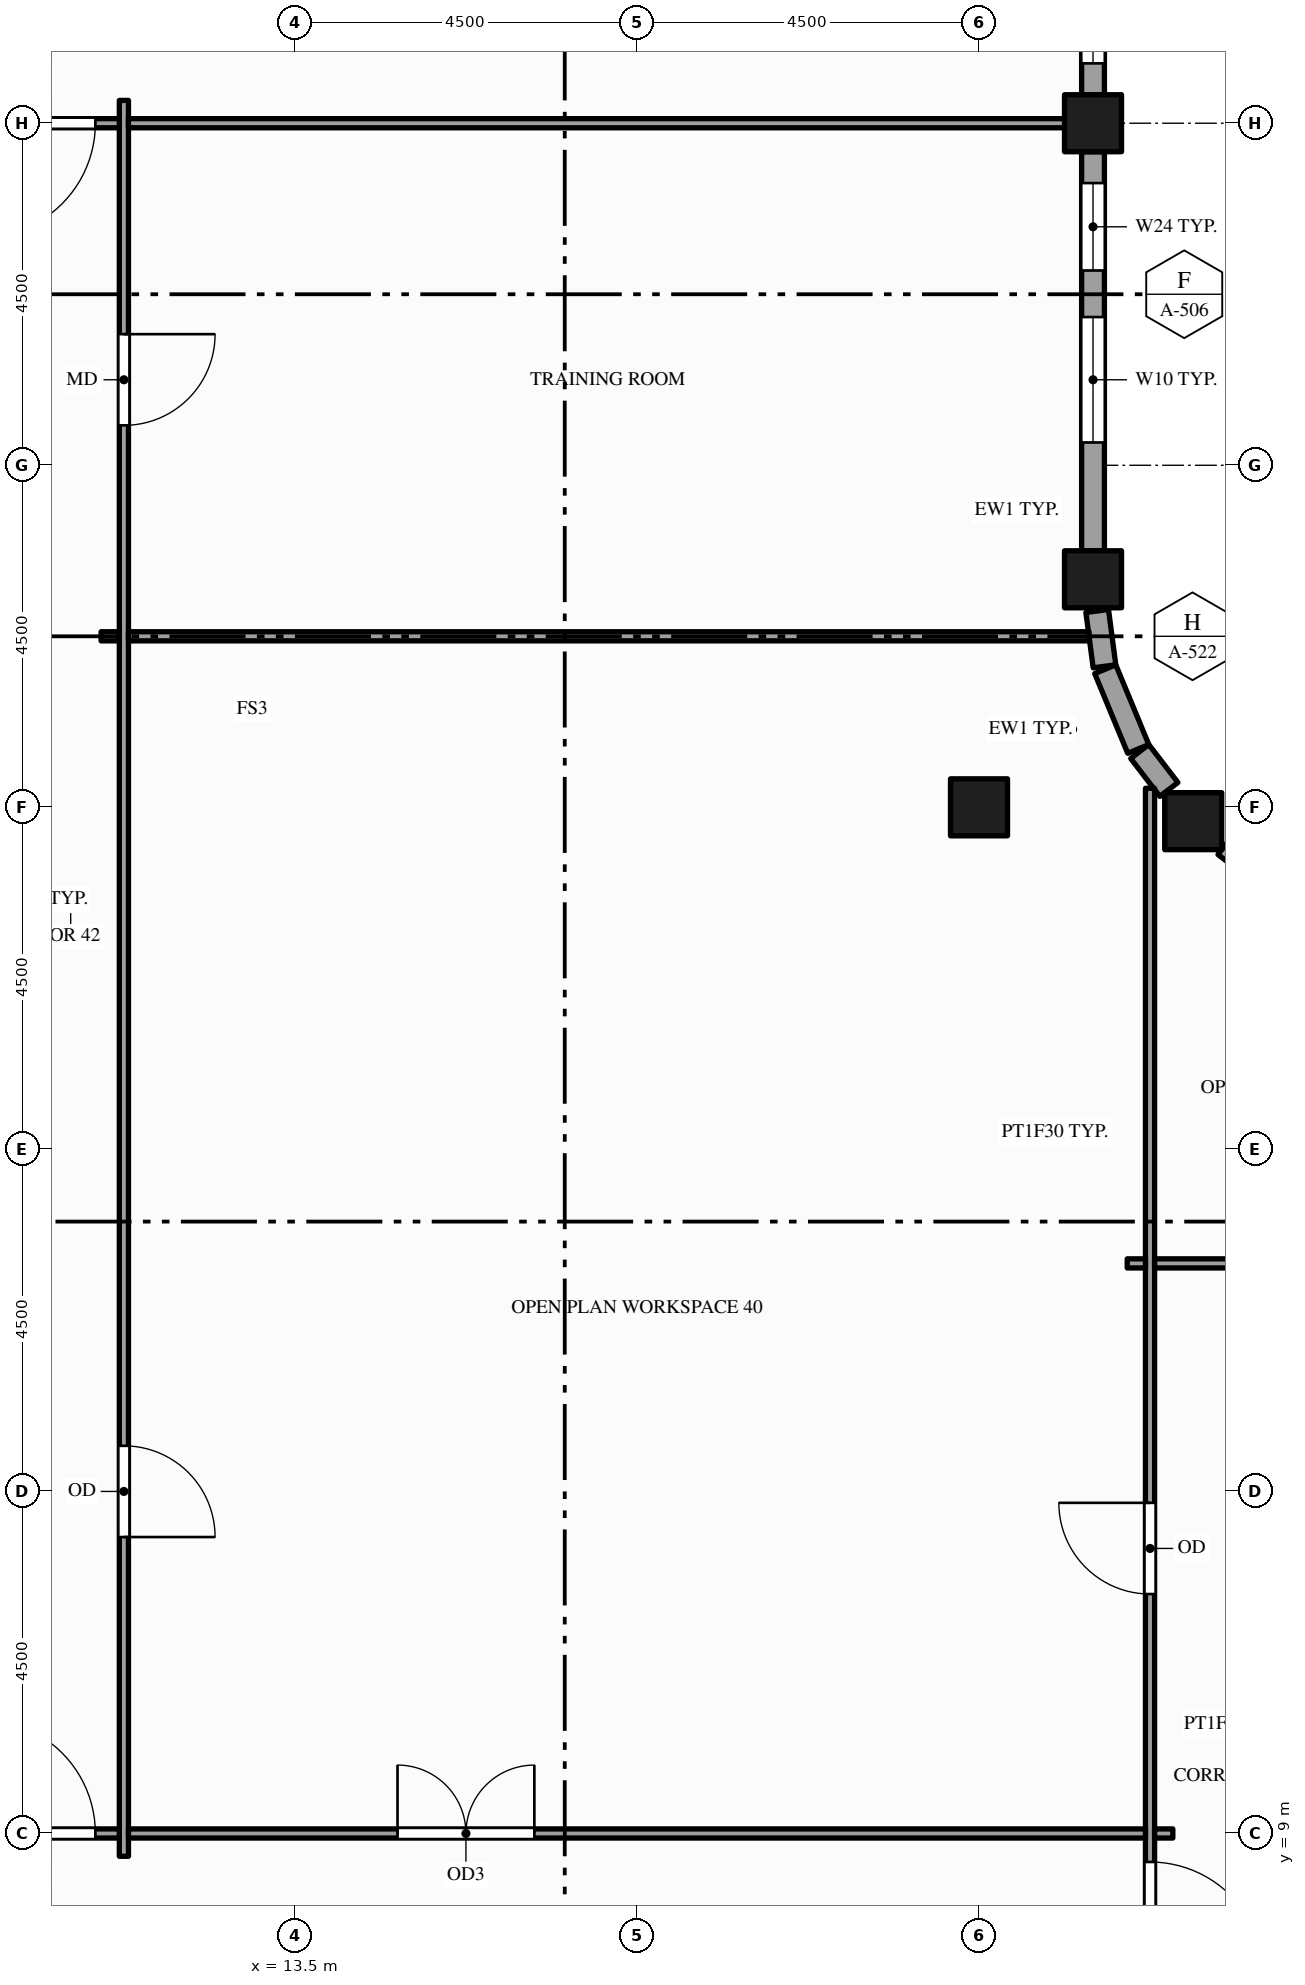
"""IFC4 building model, lengths in metres.
Left out: names, types, materials, properties, quantities, classifications, styles, units other than length and angle.
Written with IfcOpenShell. Run it as: python <this file> out.ifc"""

import sys

from ifc_helpers import new_model, si_unit, direction, frame, frame_2d, origin, origin_2d, place, context, subcontext, project, spatial, rectangle, hollow_rectangle, extrude, element, fill, save


model = new_model("IFC4")
c1 = context("Model", 3, precision=1e-05, world=origin(), true_north=direction((0.0, 1.0)))
c2 = subcontext(c1, "Body", "Model", "MODEL_VIEW")
j1 = project(units=[si_unit("LENGTHUNIT", "METRE"), si_unit("PLANEANGLEUNIT", "RADIAN")], contexts=[c1])
p1 = place(None, origin())
s1 = spatial("IfcSite", under=j1, at=p1, CompositionType="ELEMENT")
p2 = place(p1, origin())
s2 = spatial("IfcBuilding", under=s1, at=p2, CompositionType="ELEMENT")
p3 = place(p2, frame((0.0, 0.0, 215.0)))
s3 = spatial("IfcBuildingStorey", under=s2, at=p3, CompositionType="ELEMENT", Elevation=215.0)
for number, where, z_axis, x_axis in (
    (1, (22.5, 22.5, -0.15), (0.0, 0.0, 1.0), (1.0, 0.0, 0.0)),
    (2, (24.0, 25.5, -0.15), (0.0, 0.0, 1.0), (1.0, 0.0, 0.0)),
    (3, (24.0, 31.5, -0.15), (0.0, 0.0, 1.0), (1.0, 0.0, 0.0)),
    (4, (25.318, 22.318, -0.15), (0.0, 0.0, 1.0), (1.0, 0.0, 0.0)),
):
    element("IfcColumn", number, at=place(p3, frame(where, z_axis=z_axis, x_axis=x_axis)), inside=s3, PredefinedType="COLUMN", context=c2, shape_type="SweptSolid", body=[
        extrude(hollow_rectangle(XDim=0.75, YDim=0.75, WallThickness=0.036, at=origin_2d()), origin(), (0.0, 0.0, 1.0), 4.0),
    ])
p4 = place(p3, frame((26.234, 21.615, 0.0), z_axis=(0.0, 0.0, 1.0), x_axis=(-0.793575131083, 0.608472276547, 0.0)))
e5 = element("IfcWall", 5, at=p4, inside=s3, PredefinedType="STANDARD", context=c2, shape_type="SweptSolid", body=[
    extrude(rectangle(XDim=0.629, YDim=0.3, at=frame_2d((0.314, 0.0))), origin(), (0.0, 0.0, 1.0), 3.157),
])
p5 = place(p3, frame((24.998, 22.735, 0.0), z_axis=(0.0, 0.0, 1.0), x_axis=(-0.608472276547, 0.793575131083, 0.0)))
e6 = element("IfcWall", 6, at=p5, inside=s3, PredefinedType="STANDARD", context=c2, shape_type="SweptSolid", body=[
    extrude(rectangle(XDim=0.629, YDim=0.3, at=frame_2d((0.314, 0.0))), origin(), (0.0, 0.0, 1.0), 2.76),
])
p6 = place(p3, frame((24.595, 23.268, 0.0), z_axis=(0.0, 0.0, 1.0), x_axis=(-0.382598720491, 0.923914616768, 0.0)))
e7 = element("IfcWall", 7, at=p6, inside=s3, PredefinedType="STANDARD", context=c2, shape_type="SweptSolid", body=[
    extrude(rectangle(XDim=1.135, YDim=0.3, at=frame_2d((0.568, 0.0))), origin(), (0.0, 0.0, 1.0), 2.76),
])
p7 = place(p3, frame((24.151, 24.355, 0.0), z_axis=(0.0, 0.0, 1.0), x_axis=(-0.130660917588, 0.99142711513, 0.0)))
e8 = element("IfcWall", 8, at=p7, inside=s3, PredefinedType="STANDARD", context=c2, shape_type="SweptSolid", body=[
    extrude(rectangle(XDim=0.734, YDim=0.3, at=frame_2d((0.367, 0.0))), origin(), (0.0, 0.0, 1.0), 3.157),
])
p8 = place(p3, frame((24.0, 25.875, 0.0), z_axis=(0.0, 0.0, 1.0), x_axis=(0.0, 1.0, 0.0)))
e9 = element("IfcWall", 9, at=p8, inside=s3, PredefinedType="STANDARD", context=c2, shape_type="SweptSolid", body=[
    extrude(rectangle(XDim=5.25, YDim=0.3, at=frame_2d((2.625, 0.0))), origin(), (0.0, 0.0, 1.0), 3.157),
])
p9 = place(p8, frame((1.425, 0.0, 0.9)))
e10 = element("IfcOpeningElement", 10, at=p9, cuts=e9, PredefinedType="OPENING", context=c2, shape_type="SweptSolid", body=[
    extrude(rectangle(XDim=1.65, YDim=2.0, at=frame_2d((0.825, 1.0))), frame((0.0, 0.16, 0.0), z_axis=(0.0, -1.0, 0.0), x_axis=(1.0, 0.0, 0.0)), (0.0, 0.0, 1.0), 0.32),
])
p10 = place(p8, frame((3.688, 0.0, 0.9)))
e11 = element("IfcOpeningElement", 11, at=p10, cuts=e9, PredefinedType="OPENING", context=c2, shape_type="SweptSolid", body=[
    extrude(rectangle(XDim=1.15, YDim=2.0, at=frame_2d((0.575, 1.0))), frame((0.0, 0.16, 0.0), z_axis=(0.0, -1.0, 0.0), x_axis=(1.0, 0.0, 0.0)), (0.0, 0.0, 1.0), 0.32),
])
p11 = place(p3, frame((24.0, 31.875, 0.0), z_axis=(0.0, 0.0, 1.0), x_axis=(0.0, 1.0, 0.0)))
e12 = element("IfcWall", 12, at=p11, inside=s3, PredefinedType="STANDARD", context=c2, shape_type="SweptSolid", body=[
    extrude(rectangle(XDim=3.75, YDim=0.3, at=frame_2d((1.875, 0.0))), origin(), (0.0, 0.0, 1.0), 3.157),
])
p12 = place(p11, frame((0.413, 0.0, 0.9)))
e13 = element("IfcOpeningElement", 13, at=p12, cuts=e12, PredefinedType="OPENING", context=c2, shape_type="SweptSolid", body=[
    extrude(rectangle(XDim=1.15, YDim=2.0, at=frame_2d((0.575, 1.0))), frame((0.0, 0.16, 0.0), z_axis=(0.0, -1.0, 0.0), x_axis=(1.0, 0.0, 0.0)), (0.0, 0.0, 1.0), 0.32),
])
p13 = place(p11, frame((2.188, 0.0, 0.9)))
e14 = element("IfcOpeningElement", 14, at=p13, cuts=e12, PredefinedType="OPENING", context=c2, shape_type="SweptSolid", body=[
    extrude(rectangle(XDim=1.15, YDim=2.0, at=frame_2d((0.575, 1.0))), frame((0.0, 0.16, 0.0), z_axis=(0.0, -1.0, 0.0), x_axis=(1.0, 0.0, 0.0)), (0.0, 0.0, 1.0), 0.32),
])
p14 = place(p3, frame((11.25, 8.7, 0.0), z_axis=(0.0, 0.0, 1.0), x_axis=(0.0, 1.0, 0.0)))
e15 = element("IfcWall", 15, at=p14, inside=s3, PredefinedType="PARTITIONING", context=c2, shape_type="SweptSolid", body=[
    extrude(rectangle(XDim=23.1, YDim=0.12, at=frame_2d((11.55, 0.0))), origin(), (0.0, 0.0, 1.0), 2.6),
])
p15 = place(p14, frame((18.825, 0.0, 0.0)))
e16 = element("IfcOpeningElement", 16, at=p15, cuts=e15, PredefinedType="OPENING", context=c2, shape_type="SweptSolid", body=[
    extrude(rectangle(XDim=1.2, YDim=2.1, at=frame_2d((0.6, 1.05))), frame((0.0, 0.07, 0.0), z_axis=(0.0, -1.0, 0.0), x_axis=(1.0, 0.0, 0.0)), (0.0, 0.0, 1.0), 0.14),
])
p16 = place(p14, frame((4.2, 0.0, 0.0)))
e17 = element("IfcOpeningElement", 17, at=p16, cuts=e15, PredefinedType="OPENING", context=c2, shape_type="SweptSolid", body=[
    extrude(rectangle(XDim=1.2, YDim=2.1, at=frame_2d((0.6, 1.05))), frame((0.0, 0.07, 0.0), z_axis=(0.0, -1.0, 0.0), x_axis=(1.0, 0.0, 0.0)), (0.0, 0.0, 1.0), 0.14),
])
p17 = place(p3, frame((24.75, -1.35, 0.0), z_axis=(0.0, 0.0, 1.0), x_axis=(0.0, 1.0, 0.0)))
e18 = element("IfcWall", 18, at=p17, inside=s3, PredefinedType="PARTITIONING", context=c2, shape_type="SweptSolid", body=[
    extrude(rectangle(XDim=24.101, YDim=0.12, at=frame_2d((12.05, 0.0))), origin(), (0.0, 0.0, 1.0), 2.76),
])
p18 = place(p17, frame((8.475, 0.0, 0.0)))
e19 = element("IfcOpeningElement", 19, at=p18, cuts=e18, PredefinedType="OPENING", context=c2, shape_type="SweptSolid", body=[
    extrude(rectangle(XDim=1.5, YDim=2.1, at=frame_2d((0.75, 1.05))), frame((0.0, 0.07, 0.0), z_axis=(0.0, -1.0, 0.0), x_axis=(1.0, 0.0, 0.0)), (0.0, 0.0, 1.0), 0.14),
])
p19 = place(p17, frame((13.5, 0.0, 0.0)))
e20 = element("IfcOpeningElement", 20, at=p19, cuts=e18, PredefinedType="OPENING", context=c2, shape_type="SweptSolid", body=[
    extrude(rectangle(XDim=1.2, YDim=2.1, at=frame_2d((0.6, 1.05))), frame((0.0, 0.07, 0.0), z_axis=(0.0, -1.0, 0.0), x_axis=(1.0, 0.0, 0.0)), (0.0, 0.0, 1.0), 0.14),
])
p20 = place(p3, frame((9.06, 9.0, 0.0), z_axis=(0.0, 0.0, 1.0), x_axis=(1.0, 0.0, 0.0)))
e21 = element("IfcWall", 21, at=p20, inside=s3, PredefinedType="PARTITIONING", context=c2, shape_type="SweptSolid", body=[
    extrude(rectangle(XDim=2.13, YDim=0.12, at=frame_2d((1.065, 0.0))), origin(), (0.0, 0.0, 1.0), 2.87),
])
p21 = place(p20, frame((0.315, 0.0, 0.0)))
e22 = element("IfcOpeningElement", 22, at=p21, cuts=e21, PredefinedType="OPENING", context=c2, shape_type="SweptSolid", body=[
    extrude(rectangle(XDim=1.5, YDim=2.1, at=frame_2d((0.75, 1.05))), frame((0.0, 0.07, 0.0), z_axis=(0.0, -1.0, 0.0), x_axis=(1.0, 0.0, 0.0)), (0.0, 0.0, 1.0), 0.14),
])
p22 = place(p3, frame((11.31, 9.0, 0.0), z_axis=(0.0, 0.0, 1.0), x_axis=(1.0, 0.0, 0.0)))
e23 = element("IfcWall", 23, at=p22, inside=s3, PredefinedType="PARTITIONING", context=c2, shape_type="SweptSolid", body=[
    extrude(rectangle(XDim=13.38, YDim=0.12, at=frame_2d((6.69, 0.0))), origin(), (0.0, 0.0, 1.0), 2.76),
])
p23 = place(p22, frame((3.54, 0.0, 0.0)))
e24 = element("IfcOpeningElement", 24, at=p23, cuts=e23, PredefinedType="OPENING", context=c2, shape_type="SweptSolid", body=[
    extrude(rectangle(XDim=1.8, YDim=2.1, at=frame_2d((0.9, 1.05))), frame((0.0, 0.07, 0.0), z_axis=(0.0, -1.0, 0.0), x_axis=(1.0, 0.0, 0.0)), (0.0, 0.0, 1.0), 0.14),
])
for number, where, z_axis, x_axis in (
    (25, (24.81, 9.0, 0.0), (0.0, 0.0, 1.0), (1.0, 0.0, 0.0)),
    (26, (24.45, 16.5, 0.0), (0.0, 0.0, 1.0), (1.0, 0.0, 0.0)),
):
    element("IfcWall", number, at=place(p3, frame(where, z_axis=z_axis, x_axis=x_axis)), inside=s3, PredefinedType="PARTITIONING", context=c2, shape_type="SweptSolid", body=[
        extrude(rectangle(XDim=0.24, YDim=0.12, at=frame_2d((0.12, 0.0))), origin(), (0.0, 0.0, 1.0), 2.76),
    ])
p24 = place(p3, frame((24.81, 16.5, 0.0), z_axis=(0.0, 0.0, 1.0), x_axis=(1.0, 0.0, 0.0)))
e27 = element("IfcWall", 27, at=p24, inside=s3, PredefinedType="PARTITIONING", context=c2, shape_type="SweptSolid", body=[
    extrude(rectangle(XDim=2.13, YDim=0.12, at=frame_2d((1.065, 0.0))), origin(), (0.0, 0.0, 1.0), 2.76),
])
p25 = place(p3, frame((10.95, 24.75, 0.0), z_axis=(0.0, 0.0, 1.0), x_axis=(1.0, 0.0, 0.0)))
e28 = element("IfcWall", 28, at=p25, inside=s3, PredefinedType="PARTITIONING", context=c2, shape_type="SweptSolid", body=[
    extrude(rectangle(XDim=0.24, YDim=0.12, at=frame_2d((0.12, 0.0))), origin(), (0.0, 0.0, 1.0), 2.87),
])
p26 = place(p3, frame((11.31, 24.75, 0.0), z_axis=(0.0, 0.0, 1.0), x_axis=(1.0, 0.0, 0.0)))
e29 = element("IfcWall", 29, at=p26, inside=s3, PredefinedType="PARTITIONING", context=c2, shape_type="SweptSolid", body=[
    extrude(rectangle(XDim=12.637, YDim=0.12, at=frame_2d((6.319, 0.0))), origin(), (0.0, 0.0, 1.0), 2.87),
])
p27 = place(p3, frame((9.06, 31.5, 0.0), z_axis=(0.0, 0.0, 1.0), x_axis=(1.0, 0.0, 0.0)))
e30 = element("IfcWall", 30, at=p27, inside=s3, PredefinedType="PARTITIONING", context=c2, shape_type="SweptSolid", body=[
    extrude(rectangle(XDim=2.13, YDim=0.12, at=frame_2d((1.065, 0.0))), origin(), (0.0, 0.0, 1.0), 2.87),
])
p28 = place(p27, frame((0.315, 0.0, 0.0)))
e31 = element("IfcOpeningElement", 31, at=p28, cuts=e30, PredefinedType="OPENING", context=c2, shape_type="SweptSolid", body=[
    extrude(rectangle(XDim=1.5, YDim=2.1, at=frame_2d((0.75, 1.05))), frame((0.0, 0.07, 0.0), z_axis=(0.0, -1.0, 0.0), x_axis=(1.0, 0.0, 0.0)), (0.0, 0.0, 1.0), 0.14),
])
p29 = place(p3, frame((11.31, 31.5, 0.0), z_axis=(0.0, 0.0, 1.0), x_axis=(1.0, 0.0, 0.0)))
e32 = element("IfcWall", 32, at=p29, inside=s3, PredefinedType="PARTITIONING", context=c2, shape_type="SweptSolid", body=[
    extrude(rectangle(XDim=12.54, YDim=0.12, at=frame_2d((6.27, 0.0))), origin(), (0.0, 0.0, 1.0), 2.87),
])
p30 = place(p9, origin())
e33 = element("IfcWindow", 33, at=p30, inside=s3, PartitioningType="SINGLE_PANEL", PredefinedType="WINDOW", context=c2, shape_type="SweptSolid", body=[
    extrude(rectangle(XDim=1.65, YDim=2.0, at=frame_2d((0.825, 1.0))), frame((0.0, 0.03, 0.0), z_axis=(0.0, -1.0, 0.0), x_axis=(1.0, 0.0, 0.0)), (0.0, 0.0, 1.0), 0.06),
])
fill(e10, e33)
p31 = place(p10, origin())
e34 = element("IfcWindow", 34, at=p31, inside=s3, PartitioningType="SINGLE_PANEL", PredefinedType="WINDOW", context=c2, shape_type="SweptSolid", body=[
    extrude(rectangle(XDim=1.15, YDim=2.0, at=frame_2d((0.575, 1.0))), frame((0.0, 0.03, 0.0), z_axis=(0.0, -1.0, 0.0), x_axis=(1.0, 0.0, 0.0)), (0.0, 0.0, 1.0), 0.06),
])
fill(e11, e34)
p32 = place(p12, origin())
e35 = element("IfcWindow", 35, at=p32, inside=s3, PartitioningType="SINGLE_PANEL", PredefinedType="WINDOW", context=c2, shape_type="SweptSolid", body=[
    extrude(rectangle(XDim=1.15, YDim=2.0, at=frame_2d((0.575, 1.0))), frame((0.0, 0.03, 0.0), z_axis=(0.0, -1.0, 0.0), x_axis=(1.0, 0.0, 0.0)), (0.0, 0.0, 1.0), 0.06),
])
fill(e13, e35)
p33 = place(p18, origin())
e36 = element("IfcDoor", 36, at=p33, inside=s3, OperationType="SINGLE_SWING_LEFT", PredefinedType="DOOR", context=c2, shape_type="SweptSolid", body=[
    extrude(rectangle(XDim=1.5, YDim=2.1, at=frame_2d((0.75, 1.05))), frame((0.0, 0.025, 0.0), z_axis=(0.0, -1.0, 0.0), x_axis=(1.0, 0.0, 0.0)), (0.0, 0.0, 1.0), 0.05),
])
fill(e19, e36)
p34 = place(p23, origin())
e37 = element("IfcDoor", 37, at=p34, inside=s3, OperationType="DOUBLE_DOOR_SINGLE_SWING", PredefinedType="DOOR", context=c2, shape_type="SweptSolid", body=[
    extrude(rectangle(XDim=1.8, YDim=2.1, at=frame_2d((0.9, 1.05))), frame((0.0, 0.025, 0.0), z_axis=(0.0, -1.0, 0.0), x_axis=(1.0, 0.0, 0.0)), (0.0, 0.0, 1.0), 0.05),
])
fill(e24, e37)
p35 = place(p21, origin())
e38 = element("IfcDoor", 38, at=p35, inside=s3, OperationType="SINGLE_SWING_LEFT", PredefinedType="DOOR", context=c2, shape_type="SweptSolid", body=[
    extrude(rectangle(XDim=1.5, YDim=2.1, at=frame_2d((0.75, 1.05))), frame((0.0, 0.025, 0.0), z_axis=(0.0, -1.0, 0.0), x_axis=(1.0, 0.0, 0.0)), (0.0, 0.0, 1.0), 0.05),
])
fill(e22, e38)
p36 = place(p28, origin())
e39 = element("IfcDoor", 39, at=p36, inside=s3, OperationType="SINGLE_SWING_LEFT", PredefinedType="DOOR", context=c2, shape_type="SweptSolid", body=[
    extrude(rectangle(XDim=1.5, YDim=2.1, at=frame_2d((0.75, 1.05))), frame((0.0, 0.025, 0.0), z_axis=(0.0, -1.0, 0.0), x_axis=(1.0, 0.0, 0.0)), (0.0, 0.0, 1.0), 0.05),
])
fill(e31, e39)
p37 = place(p15, origin())
e40 = element("IfcDoor", 40, at=p37, inside=s3, OperationType="SINGLE_SWING_RIGHT", PredefinedType="DOOR", context=c2, shape_type="SweptSolid", body=[
    extrude(rectangle(XDim=1.2, YDim=2.1, at=frame_2d((0.6, 1.05))), frame((0.0, 0.025, 0.0), z_axis=(0.0, -1.0, 0.0), x_axis=(1.0, 0.0, 0.0)), (0.0, 0.0, 1.0), 0.05),
])
fill(e16, e40)
p38 = place(p16, origin())
e41 = element("IfcDoor", 41, at=p38, inside=s3, OperationType="SINGLE_SWING_LEFT", PredefinedType="DOOR", context=c2, shape_type="SweptSolid", body=[
    extrude(rectangle(XDim=1.2, YDim=2.1, at=frame_2d((0.6, 1.05))), frame((0.0, 0.025, 0.0), z_axis=(0.0, -1.0, 0.0), x_axis=(1.0, 0.0, 0.0)), (0.0, 0.0, 1.0), 0.05),
])
fill(e17, e41)
p39 = place(p19, origin())
e42 = element("IfcDoor", 42, at=p39, inside=s3, OperationType="SINGLE_SWING_RIGHT", PredefinedType="DOOR", context=c2, shape_type="SweptSolid", body=[
    extrude(rectangle(XDim=1.2, YDim=2.1, at=frame_2d((0.6, 1.05))), frame((0.0, 0.025, 0.0), z_axis=(0.0, -1.0, 0.0), x_axis=(1.0, 0.0, 0.0)), (0.0, 0.0, 1.0), 0.05),
])
fill(e20, e42)
save(model, sys.argv[1])
